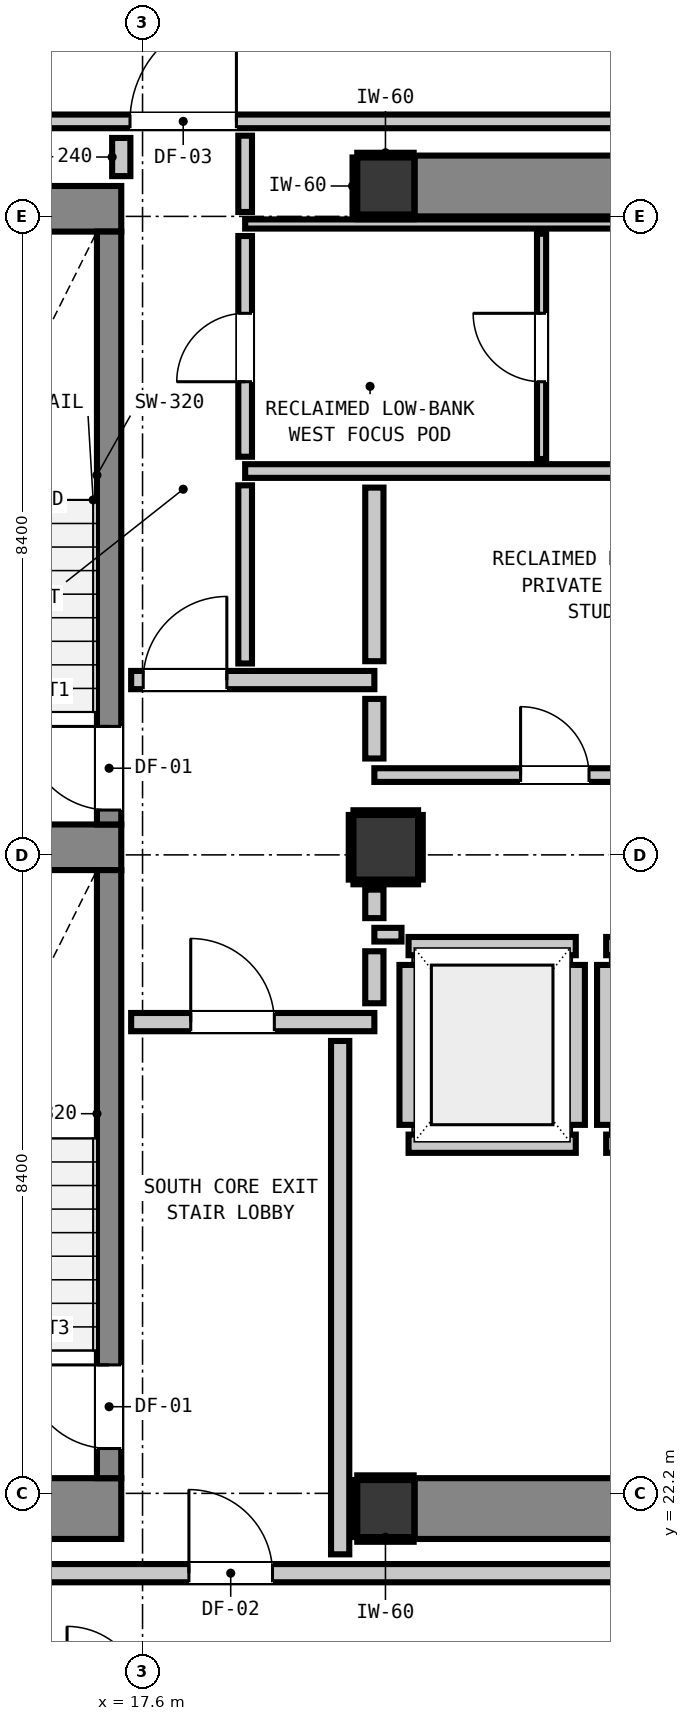
"""IFC4 building model, lengths in metres.
Left out: names, types, materials, properties, quantities, classifications, styles, units other than length and angle.
Written with IfcOpenShell. Run it as: python <this file> out.ifc"""

import sys

from ifc_helpers import new_model, si_unit, direction, frame, frame_2d, origin, origin_2d, place, context, subcontext, project, spatial, rectangle, extrude, element, fill, save


model = new_model("IFC4")
c1 = context("Model", 3, precision=1e-05, world=origin(), true_north=direction((0.0, 1.0)))
c2 = subcontext(c1, "Body", "Model", "MODEL_VIEW")
j1 = project(units=[si_unit("LENGTHUNIT", "METRE"), si_unit("PLANEANGLEUNIT", "RADIAN")], contexts=[c1])
p1 = place(None, origin())
s1 = spatial("IfcSite", under=j1, at=p1, CompositionType="ELEMENT")
p2 = place(p1, origin())
s2 = spatial("IfcBuilding", under=s1, at=p2, CompositionType="ELEMENT")
p3 = place(p2, frame((0.0, 0.0, 220.04)))
s3 = spatial("IfcBuildingStorey", under=s2, at=p3, CompositionType="ELEMENT", Elevation=220.04)
for number, where, z_axis, x_axis in (
    (1, (20.8, 22.0, 0.0), (0.0, 0.0, 1.0), (1.0, 0.0, 0.0)),
    (2, (20.8, 39.4, 0.0), (0.0, 0.0, 1.0), (1.0, 0.0, 0.0)),
):
    element("IfcColumn", number, at=place(p3, frame(where, z_axis=z_axis, x_axis=x_axis)), inside=s3, PredefinedType="COLUMN", context=c2, shape_type="SweptSolid", body=[
        extrude(rectangle(XDim=0.75, YDim=0.75, at=origin_2d()), origin(), (0.0, 0.0, 1.0), 3.32),
    ])
p4 = place(p3, frame((13.24, 22.0, 0.0), z_axis=(0.0, 0.0, 1.0), x_axis=(1.0, 0.0, 0.0)))
e3 = element("IfcWall", 3, at=p4, inside=s3, PredefinedType="SHEAR", context=c2, shape_type="SweptSolid", body=[
    extrude(rectangle(XDim=4.08, YDim=0.8, at=frame_2d((2.04, 0.0))), origin(), (0.0, 0.0, 1.0), 3.32),
])
p5 = place(p3, frame((13.24, 39.1, 0.0), z_axis=(0.0, 0.0, 1.0), x_axis=(1.0, 0.0, 0.0)))
e4 = element("IfcWall", 4, at=p5, inside=s3, PredefinedType="SHEAR", context=c2, shape_type="SweptSolid", body=[
    extrude(rectangle(XDim=4.08, YDim=0.6, at=frame_2d((2.04, 0.0))), origin(), (0.0, 0.0, 1.0), 3.32),
])
p6 = place(p3, frame((13.78, 30.7, 0.0), z_axis=(0.0, 0.0, 1.0), x_axis=(1.0, 0.0, 0.0)))
e5 = element("IfcWall", 5, at=p6, inside=s3, PredefinedType="SHEAR", context=c2, shape_type="SweptSolid", body=[
    extrude(rectangle(XDim=3.54, YDim=0.6, at=frame_2d((1.77, 0.0))), origin(), (0.0, 0.0, 1.0), 3.32),
])
for number, where, z_axis, x_axis in (
    (6, (21.18, 22.0, 0.0), (0.0, 0.0, 1.0), (1.0, 0.0, 0.0)),
    (7, (21.18, 39.4, 0.0), (0.0, 0.0, 1.0), (1.0, 0.0, 0.0)),
):
    element("IfcWall", number, at=place(p3, frame(where, z_axis=z_axis, x_axis=x_axis)), inside=s3, PredefinedType="SHEAR", context=c2, shape_type="SweptSolid", body=[
        extrude(rectangle(XDim=7.64, YDim=0.8, at=frame_2d((3.82, 0.0))), origin(), (0.0, 0.0, 1.0), 3.32),
    ])
p7 = place(p3, frame((17.16, 31.0, 0.0), z_axis=(0.0, 0.0, 1.0), x_axis=(0.0, 1.0, 0.0)))
e8 = element("IfcWall", 8, at=p7, inside=s3, PredefinedType="SHEAR", context=c2, shape_type="SweptSolid", body=[
    extrude(rectangle(XDim=7.8, YDim=0.32, at=frame_2d((3.9, 0.0))), origin(), (0.0, 0.0, 1.0), 3.32),
])
p8 = place(p7, frame((0.19, 0.0, 0.0)))
e9 = element("IfcOpeningElement", 9, at=p8, cuts=e8, PredefinedType="OPENING", context=c2, shape_type="SweptSolid", body=[
    extrude(rectangle(XDim=1.1, YDim=2.15, at=frame_2d((0.55, 1.075))), frame((0.0, 0.17, 0.0), z_axis=(0.0, -1.0, 0.0), x_axis=(1.0, 0.0, 0.0)), (0.0, 0.0, 1.0), 0.34),
])
p9 = place(p3, frame((17.16, 22.4, 0.0), z_axis=(0.0, 0.0, 1.0), x_axis=(0.0, 1.0, 0.0)))
e10 = element("IfcWall", 10, at=p9, inside=s3, PredefinedType="SHEAR", context=c2, shape_type="SweptSolid", body=[
    extrude(rectangle(XDim=8.0, YDim=0.32, at=frame_2d((4.0, 0.0))), origin(), (0.0, 0.0, 1.0), 3.32),
])
p10 = place(p9, frame((0.39, 0.0, 0.0)))
e11 = element("IfcOpeningElement", 11, at=p10, cuts=e10, PredefinedType="OPENING", context=c2, shape_type="SweptSolid", body=[
    extrude(rectangle(XDim=1.1, YDim=2.15, at=frame_2d((0.55, 1.075))), frame((0.0, 0.17, 0.0), z_axis=(0.0, -1.0, 0.0), x_axis=(1.0, 0.0, 0.0)), (0.0, 0.0, 1.0), 0.34),
])
p11 = place(p3, frame((20.8, 30.7, 0.0), z_axis=(0.0, 0.0, 1.0), x_axis=(1.0, 0.0, 0.0)))
e12 = element("IfcColumn", 12, at=p11, inside=s3, PredefinedType="COLUMN", context=c2, shape_type="SweptSolid", body=[
    extrude(rectangle(XDim=0.85, YDim=0.85, at=origin_2d()), origin(), (0.0, 0.0, 1.0), 3.32),
])
for number, where, z_axis, x_axis in (
    (13, (21.1, 26.8, 0.0), (0.0, 0.0, 1.0), (1.0, 0.0, 0.0)),
    (14, (21.1, 29.4, 0.0), (0.0, 0.0, 1.0), (1.0, 0.0, 0.0)),
):
    element("IfcWall", number, at=place(p3, frame(where, z_axis=z_axis, x_axis=x_axis)), inside=s3, PredefinedType="PARTITIONING", context=c2, shape_type="SweptSolid", body=[
        extrude(rectangle(XDim=2.2, YDim=0.24, at=frame_2d((1.1, 0.0))), origin(), (0.0, 0.0, 1.0), 3.1),
    ])
p12 = place(p3, frame((21.1, 27.048, 0.0), z_axis=(0.0, 0.0, 1.0), x_axis=(0.0, 1.0, 0.0)))
e15 = element("IfcWall", 15, at=p12, inside=s3, PredefinedType="PARTITIONING", context=c2, shape_type="SweptSolid", body=[
    extrude(rectangle(XDim=2.104, YDim=0.24, at=frame_2d((1.052, 0.0))), origin(), (0.0, 0.0, 1.0), 2.335),
])
p13 = place(p3, frame((23.3, 27.048, 0.0), z_axis=(0.0, 0.0, 1.0), x_axis=(0.0, 1.0, 0.0)))
e16 = element("IfcWall", 16, at=p13, inside=s3, PredefinedType="PARTITIONING", context=c2, shape_type="SweptSolid", body=[
    extrude(rectangle(XDim=2.104, YDim=0.24, at=frame_2d((1.052, 0.0))), origin(), (0.0, 0.0, 1.0), 3.1),
])
for number, where, z_axis, x_axis in (
    (17, (23.7, 26.8, 0.0), (0.0, 0.0, 1.0), (1.0, 0.0, 0.0)),
    (18, (23.7, 29.4, 0.0), (0.0, 0.0, 1.0), (1.0, 0.0, 0.0)),
):
    element("IfcWall", number, at=place(p3, frame(where, z_axis=z_axis, x_axis=x_axis)), inside=s3, PredefinedType="PARTITIONING", context=c2, shape_type="SweptSolid", body=[
        extrude(rectangle(XDim=2.2, YDim=0.24, at=frame_2d((1.1, 0.0))), origin(), (0.0, 0.0, 1.0), 3.1),
    ])
p14 = place(p3, frame((23.7, 27.048, 0.0), z_axis=(0.0, 0.0, 1.0), x_axis=(0.0, 1.0, 0.0)))
e19 = element("IfcWall", 19, at=p14, inside=s3, PredefinedType="PARTITIONING", context=c2, shape_type="SweptSolid", body=[
    extrude(rectangle(XDim=2.104, YDim=0.24, at=frame_2d((1.052, 0.0))), origin(), (0.0, 0.0, 1.0), 3.1),
])
p15 = place(p3, frame((10.787, 21.15, 0.0), z_axis=(0.0, 0.0, 1.0), x_axis=(1.0, 0.0, 0.0)))
e20 = element("IfcWall", 20, at=p15, inside=s3, PredefinedType="PARTITIONING", context=c2, shape_type="SweptSolid", body=[
    extrude(rectangle(XDim=36.626, YDim=0.24, at=frame_2d((18.313, 0.0))), origin(), (0.0, 0.0, 1.0), 3.1),
])
p16 = place(p15, frame((7.423, 0.0, 0.0)))
e21 = element("IfcOpeningElement", 21, at=p16, cuts=e20, PredefinedType="OPENING", context=c2, shape_type="SweptSolid", body=[
    extrude(rectangle(XDim=1.1, YDim=2.15, at=frame_2d((0.55, 1.075))), frame((0.0, 0.13, 0.0), z_axis=(0.0, -1.0, 0.0), x_axis=(1.0, 0.0, 0.0)), (0.0, 0.0, 1.0), 0.26),
])
p17 = place(p15, frame((31.314, 0.0, 0.0)))
e22 = element("IfcOpeningElement", 22, at=p17, cuts=e20, PredefinedType="OPENING", context=c2, shape_type="SweptSolid", body=[
    extrude(rectangle(XDim=0.9, YDim=2.1, at=frame_2d((0.45, 1.05))), frame((0.0, 0.13, 0.0), z_axis=(0.0, -1.0, 0.0), x_axis=(1.0, 0.0, 0.0)), (0.0, 0.0, 1.0), 0.26),
])
p18 = place(p3, frame((17.45, 28.4, 0.0), z_axis=(0.0, 0.0, 1.0), x_axis=(1.0, 0.0, 0.0)))
e23 = element("IfcWall", 23, at=p18, inside=s3, PredefinedType="PARTITIONING", context=c2, shape_type="SweptSolid", body=[
    extrude(rectangle(XDim=3.2, YDim=0.24, at=frame_2d((1.6, 0.0))), origin(), (0.0, 0.0, 1.0), 3.1),
])
p19 = place(p18, frame((0.784, 0.0, 0.0)))
e24 = element("IfcOpeningElement", 24, at=p19, cuts=e23, PredefinedType="OPENING", context=c2, shape_type="SweptSolid", body=[
    extrude(rectangle(XDim=1.1, YDim=2.15, at=frame_2d((0.55, 1.075))), frame((0.0, 0.13, 0.0), z_axis=(0.0, -1.0, 0.0), x_axis=(1.0, 0.0, 0.0)), (0.0, 0.0, 1.0), 0.26),
])
p20 = place(p3, frame((17.45, 32.9, 0.0), z_axis=(0.0, 0.0, 1.0), x_axis=(1.0, 0.0, 0.0)))
e25 = element("IfcWall", 25, at=p20, inside=s3, PredefinedType="PARTITIONING", context=c2, shape_type="SweptSolid", body=[
    extrude(rectangle(XDim=3.2, YDim=0.24, at=frame_2d((1.6, 0.0))), origin(), (0.0, 0.0, 1.0), 3.1),
])
p21 = place(p20, frame((0.159, 0.0, 0.0)))
e26 = element("IfcOpeningElement", 26, at=p21, cuts=e25, PredefinedType="OPENING", context=c2, shape_type="SweptSolid", body=[
    extrude(rectangle(XDim=1.1, YDim=2.15, at=frame_2d((0.55, 1.075))), frame((0.0, 0.13, 0.0), z_axis=(0.0, -1.0, 0.0), x_axis=(1.0, 0.0, 0.0)), (0.0, 0.0, 1.0), 0.26),
])
p22 = place(p3, frame((20.65, 29.55, 0.0), z_axis=(0.0, 0.0, 1.0), x_axis=(1.0, 0.0, 0.0)))
e27 = element("IfcWall", 27, at=p22, inside=s3, PredefinedType="PARTITIONING", context=c2, shape_type="SweptSolid", body=[
    extrude(rectangle(XDim=0.357, YDim=0.18, at=frame_2d((0.179, 0.0))), origin(), (0.0, 0.0, 1.0), 3.1),
])
p23 = place(p3, frame((20.65, 31.65, 0.0), z_axis=(0.0, 0.0, 1.0), x_axis=(1.0, 0.0, 0.0)))
e28 = element("IfcWall", 28, at=p23, inside=s3, PredefinedType="PARTITIONING", context=c2, shape_type="SweptSolid", body=[
    extrude(rectangle(XDim=7.7, YDim=0.18, at=frame_2d((3.85, 0.0))), origin(), (0.0, 0.0, 1.0), 3.1),
])
p24 = place(p23, frame((1.924, 0.0, 0.0)))
e29 = element("IfcOpeningElement", 29, at=p24, cuts=e28, PredefinedType="OPENING", context=c2, shape_type="SweptSolid", body=[
    extrude(rectangle(XDim=0.9, YDim=2.1, at=frame_2d((0.45, 1.05))), frame((0.0, 0.1, 0.0), z_axis=(0.0, -1.0, 0.0), x_axis=(1.0, 0.0, 0.0)), (0.0, 0.0, 1.0), 0.2),
])
p25 = place(p3, frame((18.95, 35.65, 0.0), z_axis=(0.0, 0.0, 1.0), x_axis=(1.0, 0.0, 0.0)))
e30 = element("IfcWall", 30, at=p25, inside=s3, PredefinedType="PARTITIONING", context=c2, shape_type="SweptSolid", body=[
    extrude(rectangle(XDim=11.025, YDim=0.18, at=frame_2d((5.513, 0.0))), origin(), (0.0, 0.0, 1.0), 3.1),
])
p26 = place(p3, frame((10.787, 40.25, 0.0), z_axis=(0.0, 0.0, 1.0), x_axis=(1.0, 0.0, 0.0)))
e31 = element("IfcWall", 31, at=p26, inside=s3, PredefinedType="PARTITIONING", context=c2, shape_type="SweptSolid", body=[
    extrude(rectangle(XDim=26.102, YDim=0.18, at=frame_2d((13.051, 0.0))), origin(), (0.0, 0.0, 1.0), 3.1),
])
p27 = place(p26, frame((6.648, 0.0, 0.0)))
e32 = element("IfcOpeningElement", 32, at=p27, cuts=e31, PredefinedType="OPENING", context=c2, shape_type="SweptSolid", body=[
    extrude(rectangle(XDim=1.4, YDim=2.15, at=frame_2d((0.7, 1.075))), frame((0.0, 0.1, 0.0), z_axis=(0.0, -1.0, 0.0), x_axis=(1.0, 0.0, 0.0)), (0.0, 0.0, 1.0), 0.2),
])
p28 = place(p3, frame((18.95, 38.9, 0.0), z_axis=(0.0, 0.0, 1.0), x_axis=(1.0, 0.0, 0.0)))
e33 = element("IfcWall", 33, at=p28, inside=s3, PredefinedType="PARTITIONING", context=c2, shape_type="SweptSolid", body=[
    extrude(rectangle(XDim=11.025, YDim=0.12, at=frame_2d((5.513, 0.0))), origin(), (0.0, 0.0, 1.0), 3.1),
])
p29 = place(p3, frame((17.32, 39.53, 0.0), z_axis=(0.0, 0.0, 1.0), x_axis=(0.0, 1.0, 0.0)))
e34 = element("IfcWall", 34, at=p29, inside=s3, PredefinedType="PARTITIONING", context=c2, shape_type="SweptSolid", body=[
    extrude(rectangle(XDim=0.502, YDim=0.24, at=frame_2d((0.251, 0.0))), origin(), (0.0, 0.0, 1.0), 3.1),
])
p30 = place(p3, frame((20.2, 21.398, 0.0), z_axis=(0.0, 0.0, 1.0), x_axis=(0.0, 1.0, 0.0)))
e35 = element("IfcWall", 35, at=p30, inside=s3, PredefinedType="PARTITIONING", context=c2, shape_type="SweptSolid", body=[
    extrude(rectangle(XDim=6.754, YDim=0.24, at=frame_2d((3.377, 0.0))), origin(), (0.0, 0.0, 1.0), 3.1),
])
p31 = place(p3, frame((20.65, 28.648, 0.0), z_axis=(0.0, 0.0, 1.0), x_axis=(0.0, 1.0, 0.0)))
e36 = element("IfcWall", 36, at=p31, inside=s3, PredefinedType="PARTITIONING", context=c2, shape_type="SweptSolid", body=[
    extrude(rectangle(XDim=0.684, YDim=0.24, at=frame_2d((0.342, 0.0))), origin(), (0.0, 0.0, 1.0), 2.335),
])
p32 = place(p3, frame((20.65, 29.768, 0.0), z_axis=(0.0, 0.0, 1.0), x_axis=(0.0, 1.0, 0.0)))
e37 = element("IfcWall", 37, at=p32, inside=s3, PredefinedType="PARTITIONING", context=c2, shape_type="SweptSolid", body=[
    extrude(rectangle(XDim=0.375, YDim=0.24, at=frame_2d((0.188, 0.0))), origin(), (0.0, 0.0, 1.0), 2.335),
])
p33 = place(p3, frame((20.65, 31.868, 0.0), z_axis=(0.0, 0.0, 1.0), x_axis=(0.0, 1.0, 0.0)))
e38 = element("IfcWall", 38, at=p33, inside=s3, PredefinedType="PARTITIONING", context=c2, shape_type="SweptSolid", body=[
    extrude(rectangle(XDim=0.784, YDim=0.24, at=frame_2d((0.392, 0.0))), origin(), (0.0, 0.0, 1.0), 2.335),
])
p34 = place(p3, frame((20.65, 33.148, 0.0), z_axis=(0.0, 0.0, 1.0), x_axis=(0.0, 1.0, 0.0)))
e39 = element("IfcWall", 39, at=p34, inside=s3, PredefinedType="PARTITIONING", context=c2, shape_type="SweptSolid", body=[
    extrude(rectangle(XDim=2.284, YDim=0.24, at=frame_2d((1.142, 0.0))), origin(), (0.0, 0.0, 1.0), 2.335),
])
p35 = place(p3, frame((18.95, 33.118, 0.0), z_axis=(0.0, 0.0, 1.0), x_axis=(0.0, 1.0, 0.0)))
e40 = element("IfcWall", 40, at=p35, inside=s3, PredefinedType="PARTITIONING", context=c2, shape_type="SweptSolid", body=[
    extrude(rectangle(XDim=2.344, YDim=0.18, at=frame_2d((1.172, 0.0))), origin(), (0.0, 0.0, 1.0), 3.1),
])
p36 = place(p3, frame((18.95, 35.838, 0.0), z_axis=(0.0, 0.0, 1.0), x_axis=(0.0, 1.0, 0.0)))
e41 = element("IfcWall", 41, at=p36, inside=s3, PredefinedType="PARTITIONING", context=c2, shape_type="SweptSolid", body=[
    extrude(rectangle(XDim=2.904, YDim=0.18, at=frame_2d((1.452, 0.0))), origin(), (0.0, 0.0, 1.0), 3.1),
])
p37 = place(p36, frame((0.987, 0.0, 0.0)))
e42 = element("IfcOpeningElement", 42, at=p37, cuts=e41, PredefinedType="OPENING", context=c2, shape_type="SweptSolid", body=[
    extrude(rectangle(XDim=0.9, YDim=2.1, at=frame_2d((0.45, 1.05))), frame((0.0, 0.1, 0.0), z_axis=(0.0, -1.0, 0.0), x_axis=(1.0, 0.0, 0.0)), (0.0, 0.0, 1.0), 0.2),
])
p38 = place(p3, frame((18.95, 39.058, 0.0), z_axis=(0.0, 0.0, 1.0), x_axis=(0.0, 1.0, 0.0)))
e43 = element("IfcWall", 43, at=p38, inside=s3, PredefinedType="PARTITIONING", context=c2, shape_type="SweptSolid", body=[
    extrude(rectangle(XDim=1.004, YDim=0.18, at=frame_2d((0.502, 0.0))), origin(), (0.0, 0.0, 1.0), 3.1),
])
p39 = place(p3, frame((22.85, 35.808, 0.0), z_axis=(0.0, 0.0, 1.0), x_axis=(0.0, 1.0, 0.0)))
e44 = element("IfcWall", 44, at=p39, inside=s3, PredefinedType="PARTITIONING", context=c2, shape_type="SweptSolid", body=[
    extrude(rectangle(XDim=2.964, YDim=0.12, at=frame_2d((1.482, 0.0))), origin(), (0.0, 0.0, 1.0), 3.1),
])
p40 = place(p39, frame((1.017, 0.0, 0.0)))
e45 = element("IfcOpeningElement", 45, at=p40, cuts=e44, PredefinedType="OPENING", context=c2, shape_type="SweptSolid", body=[
    extrude(rectangle(XDim=0.9, YDim=2.1, at=frame_2d((0.45, 1.05))), frame((0.0, 0.07, 0.0), z_axis=(0.0, -1.0, 0.0), x_axis=(1.0, 0.0, 0.0)), (0.0, 0.0, 1.0), 0.14),
])
for number, where, z_axis, x_axis in (
    (46, (20.425, 21.593, 0.0), (0.0, 0.0, 1.0), (1.0, 0.0, 0.0)),
    (47, (20.425, 22.407, 0.0), (0.0, 0.0, 1.0), (1.0, 0.0, 0.0)),
):
    element("IfcWall", number, at=place(p3, frame(where, z_axis=z_axis, x_axis=x_axis)), inside=s3, PredefinedType="PARTITIONING", context=c2, shape_type="SweptSolid", body=[
        extrude(rectangle(XDim=0.742, YDim=0.06, at=frame_2d((0.371, 0.0))), origin(), (0.0, 0.0, 1.0), 1.45),
    ])
p41 = place(p3, frame((20.393, 21.625, 0.0), z_axis=(0.0, 0.0, 1.0), x_axis=(0.0, 1.0, 0.0)))
e48 = element("IfcWall", 48, at=p41, inside=s3, PredefinedType="PARTITIONING", context=c2, shape_type="SweptSolid", body=[
    extrude(rectangle(XDim=0.75, YDim=0.06, at=frame_2d((0.375, 0.0))), origin(), (0.0, 0.0, 1.0), 1.45),
])
for number, where, z_axis, x_axis in (
    (49, (20.425, 38.993, 0.0), (0.0, 0.0, 1.0), (1.0, 0.0, 0.0)),
    (50, (20.425, 39.807, 0.0), (0.0, 0.0, 1.0), (1.0, 0.0, 0.0)),
):
    element("IfcWall", number, at=place(p3, frame(where, z_axis=z_axis, x_axis=x_axis)), inside=s3, PredefinedType="PARTITIONING", context=c2, shape_type="SweptSolid", body=[
        extrude(rectangle(XDim=0.742, YDim=0.06, at=frame_2d((0.371, 0.0))), origin(), (0.0, 0.0, 1.0), 1.45),
    ])
p42 = place(p3, frame((20.393, 39.025, 0.0), z_axis=(0.0, 0.0, 1.0), x_axis=(0.0, 1.0, 0.0)))
e51 = element("IfcWall", 51, at=p42, inside=s3, PredefinedType="PARTITIONING", context=c2, shape_type="SweptSolid", body=[
    extrude(rectangle(XDim=0.75, YDim=0.06, at=frame_2d((0.375, 0.0))), origin(), (0.0, 0.0, 1.0), 1.45),
])
for number, where, z_axis, x_axis in (
    (52, (20.375, 30.243, 0.0), (0.0, 0.0, 1.0), (1.0, 0.0, 0.0)),
    (53, (20.375, 31.157, 0.0), (0.0, 0.0, 1.0), (1.0, 0.0, 0.0)),
    (54, (20.343, 30.275, 0.0), (0.0, 0.0, 1.0), (0.0, 1.0, 0.0)),
    (55, (21.257, 30.275, 0.0), (0.0, 0.0, 1.0), (0.0, 1.0, 0.0)),
):
    element("IfcWall", number, at=place(p3, frame(where, z_axis=z_axis, x_axis=x_axis)), inside=s3, PredefinedType="PARTITIONING", context=c2, shape_type="SweptSolid", body=[
        extrude(rectangle(XDim=0.85, YDim=0.06, at=frame_2d((0.425, 0.0))), origin(), (0.0, 0.0, 1.0), 1.45),
    ])
p43 = place(p8, origin())
e56 = element("IfcDoor", 56, at=p43, inside=s3, OperationType="SINGLE_SWING_RIGHT", PredefinedType="DOOR", context=c2, shape_type="SweptSolid", body=[
    extrude(rectangle(XDim=1.1, YDim=2.15, at=frame_2d((0.55, 1.075))), frame((0.0, 0.025, 0.0), z_axis=(0.0, -1.0, 0.0), x_axis=(1.0, 0.0, 0.0)), (0.0, 0.0, 1.0), 0.05),
])
fill(e9, e56)
p44 = place(p10, origin())
e57 = element("IfcDoor", 57, at=p44, inside=s3, OperationType="SINGLE_SWING_RIGHT", PredefinedType="DOOR", context=c2, shape_type="SweptSolid", body=[
    extrude(rectangle(XDim=1.1, YDim=2.15, at=frame_2d((0.55, 1.075))), frame((0.0, 0.025, 0.0), z_axis=(0.0, -1.0, 0.0), x_axis=(1.0, 0.0, 0.0)), (0.0, 0.0, 1.0), 0.05),
])
fill(e11, e57)
p45 = place(p19, origin())
e58 = element("IfcDoor", 58, at=p45, inside=s3, OperationType="SINGLE_SWING_LEFT", PredefinedType="DOOR", context=c2, shape_type="SweptSolid", body=[
    extrude(rectangle(XDim=1.1, YDim=2.15, at=frame_2d((0.55, 1.075))), frame((0.0, 0.025, 0.0), z_axis=(0.0, -1.0, 0.0), x_axis=(1.0, 0.0, 0.0)), (0.0, 0.0, 1.0), 0.05),
])
fill(e24, e58)
p46 = place(p21, origin())
e59 = element("IfcDoor", 59, at=p46, inside=s3, OperationType="SINGLE_SWING_RIGHT", PredefinedType="DOOR", context=c2, shape_type="SweptSolid", body=[
    extrude(rectangle(XDim=1.1, YDim=2.15, at=frame_2d((0.55, 1.075))), frame((0.0, 0.025, 0.0), z_axis=(0.0, -1.0, 0.0), x_axis=(1.0, 0.0, 0.0)), (0.0, 0.0, 1.0), 0.05),
])
fill(e26, e59)
p47 = place(p16, origin())
e60 = element("IfcDoor", 60, at=p47, inside=s3, OperationType="SINGLE_SWING_LEFT", PredefinedType="DOOR", context=c2, shape_type="SweptSolid", body=[
    extrude(rectangle(XDim=1.1, YDim=2.15, at=frame_2d((0.55, 1.075))), frame((0.0, 0.025, 0.0), z_axis=(0.0, -1.0, 0.0), x_axis=(1.0, 0.0, 0.0)), (0.0, 0.0, 1.0), 0.05),
])
fill(e21, e60)
p48 = place(p27, origin())
e61 = element("IfcDoor", 61, at=p48, inside=s3, OperationType="SINGLE_SWING_RIGHT", PredefinedType="DOOR", context=c2, shape_type="SweptSolid", body=[
    extrude(rectangle(XDim=1.4, YDim=2.15, at=frame_2d((0.7, 1.075))), frame((0.0, 0.025, 0.0), z_axis=(0.0, -1.0, 0.0), x_axis=(1.0, 0.0, 0.0)), (0.0, 0.0, 1.0), 0.05),
])
fill(e32, e61)
p49 = place(p37, origin())
e62 = element("IfcDoor", 62, at=p49, inside=s3, OperationType="SINGLE_SWING_LEFT", PredefinedType="DOOR", context=c2, shape_type="SweptSolid", body=[
    extrude(rectangle(XDim=0.9, YDim=2.1, at=frame_2d((0.45, 1.05))), frame((0.0, 0.025, 0.0), z_axis=(0.0, -1.0, 0.0), x_axis=(1.0, 0.0, 0.0)), (0.0, 0.0, 1.0), 0.05),
])
fill(e42, e62)
p50 = place(p40, origin())
e63 = element("IfcDoor", 63, at=p50, inside=s3, OperationType="SINGLE_SWING_RIGHT", PredefinedType="DOOR", context=c2, shape_type="SweptSolid", body=[
    extrude(rectangle(XDim=0.9, YDim=2.1, at=frame_2d((0.45, 1.05))), frame((0.0, 0.025, 0.0), z_axis=(0.0, -1.0, 0.0), x_axis=(1.0, 0.0, 0.0)), (0.0, 0.0, 1.0), 0.05),
])
fill(e45, e63)
p51 = place(p24, origin())
e64 = element("IfcDoor", 64, at=p51, inside=s3, OperationType="SINGLE_SWING_LEFT", PredefinedType="DOOR", context=c2, shape_type="SweptSolid", body=[
    extrude(rectangle(XDim=0.9, YDim=2.1, at=frame_2d((0.45, 1.05))), frame((0.0, 0.025, 0.0), z_axis=(0.0, -1.0, 0.0), x_axis=(1.0, 0.0, 0.0)), (0.0, 0.0, 1.0), 0.05),
])
fill(e29, e64)
save(model, sys.argv[1])
